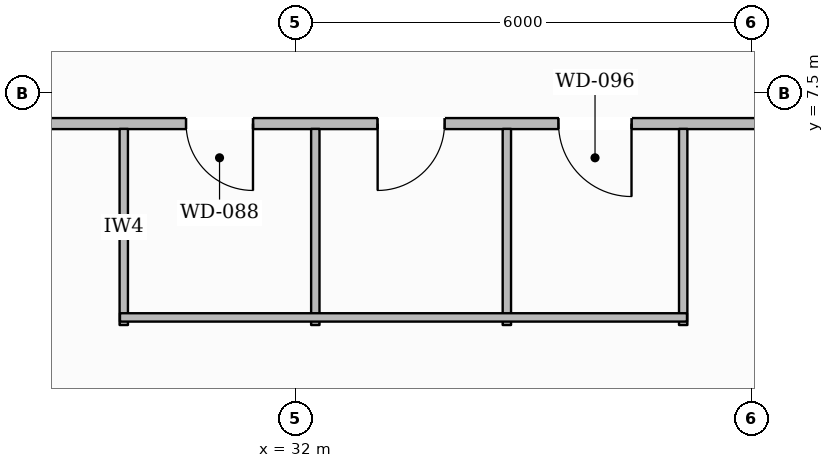
"""IFC4 building model, lengths in metres.
Left out: names, types, materials, properties, quantities, classifications, styles, units other than length and angle.
Written with IfcOpenShell. Run it as: python <this file> out.ifc"""

import sys

from ifc_helpers import new_model, si_unit, direction, frame, frame_2d, origin, place, context, subcontext, project, spatial, rectangle, extrude, element, fill, save


model = new_model("IFC4")
c1 = context("Model", 3, precision=1e-05, world=origin(), true_north=direction((0.0, 1.0)))
c2 = subcontext(c1, "Body", "Model", "MODEL_VIEW")
j1 = project(units=[si_unit("LENGTHUNIT", "METRE"), si_unit("PLANEANGLEUNIT", "RADIAN")], contexts=[c1])
p1 = place(None, origin())
s1 = spatial("IfcSite", under=j1, at=p1, CompositionType="ELEMENT")
p2 = place(p1, origin())
s2 = spatial("IfcBuilding", under=s1, at=p2, CompositionType="ELEMENT")
p3 = place(p2, frame((0.0, 0.0, 59.9)))
s3 = spatial("IfcBuildingStorey", under=s2, at=p3, CompositionType="ELEMENT", Elevation=59.9)
p4 = place(p3, frame((49.92, 7.1, 0.0), z_axis=(0.0, 0.0, 1.0), x_axis=(-1.0, 0.0, 0.0)))
e1 = element("IfcWall", 1, at=p4, inside=s3, PredefinedType="PARTITIONING", context=c2, shape_type="SweptSolid", body=[
    extrude(rectangle(XDim=23.84, YDim=0.145, at=frame_2d((11.92, 0.0))), origin(), (0.0, 0.0, 1.0), 3.278),
])
p5 = place(p4, frame((18.48, 0.0, 0.0)))
e2 = element("IfcOpeningElement", 2, at=p5, cuts=e1, PredefinedType="OPENING", context=c2, shape_type="SweptSolid", body=[
    extrude(rectangle(XDim=0.88, YDim=2.1, at=frame_2d((0.44, 1.05))), frame((0.0, 0.083, 0.0), z_axis=(0.0, -1.0, 0.0), x_axis=(1.0, 0.0, 0.0)), (0.0, 0.0, 1.0), 0.165),
])
p6 = place(p4, frame((15.96, 0.0, 0.0)))
e3 = element("IfcOpeningElement", 3, at=p6, cuts=e1, PredefinedType="OPENING", context=c2, shape_type="SweptSolid", body=[
    extrude(rectangle(XDim=0.88, YDim=2.1, at=frame_2d((0.44, 1.05))), frame((0.0, 0.083, 0.0), z_axis=(0.0, -1.0, 0.0), x_axis=(1.0, 0.0, 0.0)), (0.0, 0.0, 1.0), 0.165),
])
p7 = place(p4, frame((13.5, 0.0, 0.0)))
e4 = element("IfcOpeningElement", 4, at=p7, cuts=e1, PredefinedType="OPENING", context=c2, shape_type="SweptSolid", body=[
    extrude(rectangle(XDim=0.96, YDim=2.1, at=frame_2d((0.48, 1.05))), frame((0.0, 0.083, 0.0), z_axis=(0.0, -1.0, 0.0), x_axis=(1.0, 0.0, 0.0)), (0.0, 0.0, 1.0), 0.165),
])
p8 = place(p4, frame((5.801, 0.0, 0.0)))
e5 = element("IfcOpeningElement", 5, at=p8, cuts=e1, PredefinedType="OPENING", context=c2, shape_type="SweptSolid", body=[
    extrude(rectangle(XDim=1.4, YDim=2.2, at=frame_2d((0.7, 1.1))), frame((0.0, 0.083, 0.0), z_axis=(0.0, -1.0, 0.0), x_axis=(1.0, 0.0, 0.0)), (0.0, 0.0, 1.0), 0.165),
])
p9 = place(p3, frame((29.74, 4.45, 0.0), z_axis=(0.0, 0.0, 1.0), x_axis=(0.0, 1.0, 0.0)))
e6 = element("IfcWall", 6, at=p9, inside=s3, PredefinedType="PLUMBINGWALL", context=c2, shape_type="SweptSolid", body=[
    extrude(rectangle(XDim=2.58, YDim=0.11, at=frame_2d((1.29, 0.0))), origin(), (0.0, 0.0, 1.0), 3.59),
])
p10 = place(p3, frame((32.26, 4.45, 0.0), z_axis=(0.0, 0.0, 1.0), x_axis=(0.0, 1.0, 0.0)))
e7 = element("IfcWall", 7, at=p10, inside=s3, PredefinedType="PLUMBINGWALL", context=c2, shape_type="SweptSolid", body=[
    extrude(rectangle(XDim=2.58, YDim=0.11, at=frame_2d((1.29, 0.0))), origin(), (0.0, 0.0, 1.0), 3.057),
])
for number, where, z_axis, x_axis in (
    (8, (34.78, 4.45, 0.0), (0.0, 0.0, 1.0), (0.0, 1.0, 0.0)),
    (9, (37.1, 4.45, 0.0), (0.0, 0.0, 1.0), (0.0, 1.0, 0.0)),
):
    element("IfcWall", number, at=place(p3, frame(where, z_axis=z_axis, x_axis=x_axis)), inside=s3, PredefinedType="PLUMBINGWALL", context=c2, shape_type="SweptSolid", body=[
        extrude(rectangle(XDim=2.58, YDim=0.11, at=frame_2d((1.29, 0.0))), origin(), (0.0, 0.0, 1.0), 3.59),
    ])
p11 = place(p3, frame((29.69, 4.55, 0.0), z_axis=(0.0, 0.0, 1.0), x_axis=(1.0, 0.0, 0.0)))
e10 = element("IfcWall", 10, at=p11, inside=s3, PredefinedType="PLUMBINGWALL", context=c2, shape_type="SweptSolid", body=[
    extrude(rectangle(XDim=7.46, YDim=0.11, at=frame_2d((3.73, 0.0))), origin(), (0.0, 0.0, 1.0), 3.59),
])
p12 = place(p5, origin())
e11 = element("IfcDoor", 11, at=p12, inside=s3, OperationType="SINGLE_SWING_LEFT", PredefinedType="DOOR", context=c2, shape_type="SweptSolid", body=[
    extrude(rectangle(XDim=0.88, YDim=2.1, at=frame_2d((0.44, 1.05))), frame((0.0, 0.025, 0.0), z_axis=(0.0, -1.0, 0.0), x_axis=(1.0, 0.0, 0.0)), (0.0, 0.0, 1.0), 0.05),
])
fill(e2, e11)
p13 = place(p6, origin())
e12 = element("IfcDoor", 12, at=p13, inside=s3, OperationType="SINGLE_SWING_RIGHT", PredefinedType="DOOR", context=c2, shape_type="SweptSolid", body=[
    extrude(rectangle(XDim=0.88, YDim=2.1, at=frame_2d((0.44, 1.05))), frame((0.0, 0.025, 0.0), z_axis=(0.0, -1.0, 0.0), x_axis=(1.0, 0.0, 0.0)), (0.0, 0.0, 1.0), 0.05),
])
fill(e3, e12)
p14 = place(p7, origin())
e13 = element("IfcDoor", 13, at=p14, inside=s3, OperationType="SINGLE_SWING_LEFT", PredefinedType="DOOR", context=c2, shape_type="SweptSolid", body=[
    extrude(rectangle(XDim=0.96, YDim=2.1, at=frame_2d((0.48, 1.05))), frame((0.0, 0.025, 0.0), z_axis=(0.0, -1.0, 0.0), x_axis=(1.0, 0.0, 0.0)), (0.0, 0.0, 1.0), 0.05),
])
fill(e4, e13)
save(model, sys.argv[1])
